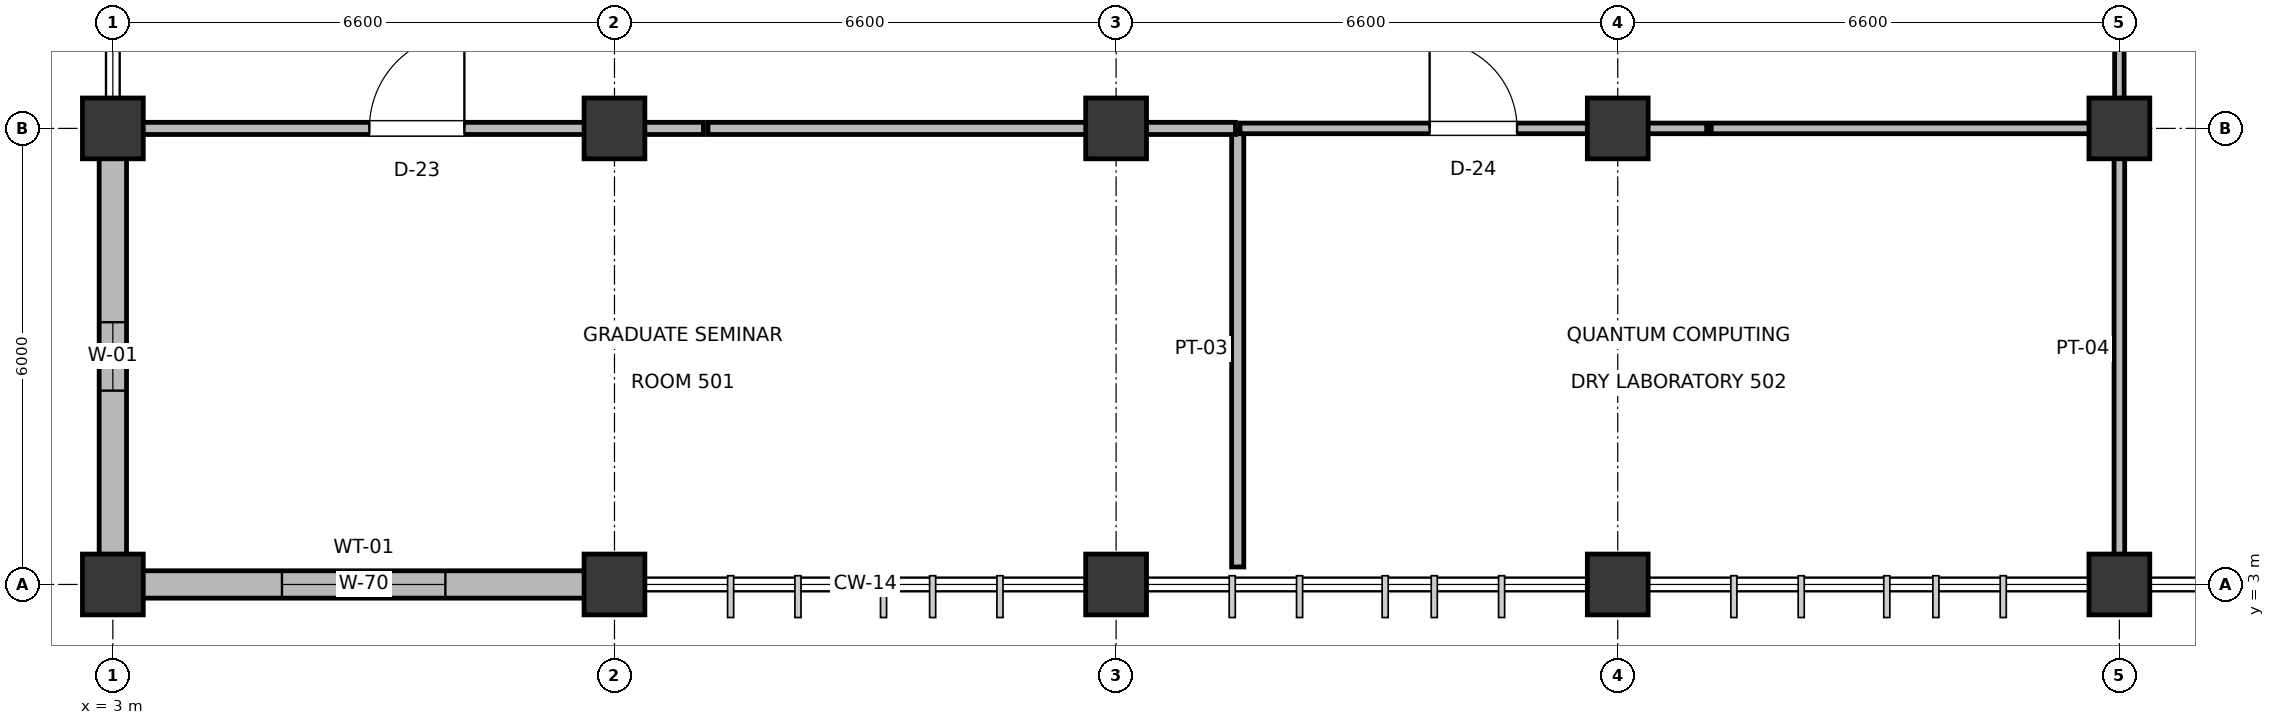
"""IFC4 building model, lengths in metres.
Left out: names, types, materials, properties, quantities, classifications, styles, units other than length and angle.
Written with IfcOpenShell. Run it as: python <this file> out.ifc"""

import sys

from ifc_helpers import new_model, si_unit, direction, frame, frame_2d, origin, origin_2d, place, context, subcontext, project, spatial, rectangle, extrude, element, fill, save


model = new_model("IFC4")
c1 = context("Model", 3, precision=1e-05, world=origin(), true_north=direction((0.0, 1.0)))
c2 = subcontext(c1, "Body", "Model", "MODEL_VIEW")
j1 = project(units=[si_unit("LENGTHUNIT", "METRE"), si_unit("PLANEANGLEUNIT", "RADIAN")], contexts=[c1])
p1 = place(None, origin())
s1 = spatial("IfcSite", under=j1, at=p1, CompositionType="ELEMENT")
p2 = place(p1, origin())
s2 = spatial("IfcBuilding", under=s1, at=p2, CompositionType="ELEMENT")
p3 = place(p2, frame((0.0, 0.0, 24.0)))
s3 = spatial("IfcBuildingStorey", under=s2, at=p3, CompositionType="ELEMENT", Elevation=24.0)
for number, where, z_axis, x_axis in (
    (1, (3.0, 3.0, 0.0), (0.0, 0.0, 1.0), (1.0, 0.0, 0.0)),
    (2, (3.0, 9.0, 0.0), (0.0, 0.0, 1.0), (1.0, 0.0, 0.0)),
    (3, (9.6, 3.0, 0.0), (0.0, 0.0, 1.0), (1.0, 0.0, 0.0)),
    (4, (9.6, 9.0, 0.0), (0.0, 0.0, 1.0), (1.0, 0.0, 0.0)),
    (5, (16.2, 3.0, 0.0), (0.0, 0.0, 1.0), (1.0, 0.0, 0.0)),
    (6, (16.2, 9.0, 0.0), (0.0, 0.0, 1.0), (1.0, 0.0, 0.0)),
    (7, (22.8, 3.0, 0.0), (0.0, 0.0, 1.0), (1.0, 0.0, 0.0)),
    (8, (22.8, 9.0, 0.0), (0.0, 0.0, 1.0), (1.0, 0.0, 0.0)),
    (9, (29.4, 3.0, 0.0), (0.0, 0.0, 1.0), (1.0, 0.0, 0.0)),
    (10, (29.4, 9.0, 0.0), (0.0, 0.0, 1.0), (1.0, 0.0, 0.0)),
):
    element("IfcColumn", number, at=place(p3, frame(where, z_axis=z_axis, x_axis=x_axis)), inside=s3, PredefinedType="COLUMN", context=c2, shape_type="SweptSolid", body=[
        extrude(rectangle(XDim=0.8, YDim=0.8, at=origin_2d()), origin(), (0.0, 0.0, 1.0), 4.5),
    ])
p4 = place(p3, frame((3.385, 3.0, 0.0), z_axis=(0.0, 0.0, 1.0), x_axis=(1.0, 0.0, 0.0)))
e11 = element("IfcWall", 11, at=p4, inside=s3, PredefinedType="SOLIDWALL", context=c2, shape_type="SweptSolid", body=[
    extrude(rectangle(XDim=5.83, YDim=0.36, at=frame_2d((2.915, 0.0))), origin(), (0.0, 0.0, 1.0), 2.87),
])
p5 = place(p4, frame((1.84, 0.0, 0.9)))
e12 = element("IfcOpeningElement", 12, at=p5, cuts=e11, PredefinedType="OPENING", context=c2, shape_type="SweptSolid", body=[
    extrude(rectangle(XDim=2.15, YDim=1.35, at=frame_2d((1.075, 0.675))), frame((0.0, 0.19, 0.0), z_axis=(0.0, -1.0, 0.0), x_axis=(1.0, 0.0, 0.0)), (0.0, 0.0, 1.0), 0.38),
])
p6 = place(p3, frame((3.0, 3.385, 0.0), z_axis=(0.0, 0.0, 1.0), x_axis=(0.0, 1.0, 0.0)))
e13 = element("IfcWall", 13, at=p6, inside=s3, PredefinedType="SOLIDWALL", context=c2, shape_type="SweptSolid", body=[
    extrude(rectangle(XDim=5.23, YDim=0.36, at=frame_2d((2.615, 0.0))), origin(), (0.0, 0.0, 1.0), 3.575),
])
p7 = place(p6, frame((2.165, 0.0, 0.9)))
e14 = element("IfcOpeningElement", 14, at=p7, cuts=e13, PredefinedType="OPENING", context=c2, shape_type="SweptSolid", body=[
    extrude(rectangle(XDim=0.9, YDim=1.8, at=frame_2d((0.45, 0.9))), frame((0.0, 0.19, 0.0), z_axis=(0.0, -1.0, 0.0), x_axis=(1.0, 0.0, 0.0)), (0.0, 0.0, 1.0), 0.38),
])
p8 = place(p3, frame((17.8, 3.23, 0.0), z_axis=(0.0, 0.0, 1.0), x_axis=(0.0, 1.0, 0.0)))
e15 = element("IfcWall", 15, at=p8, inside=s3, PredefinedType="PARTITIONING", context=c2, shape_type="SweptSolid", body=[
    extrude(rectangle(XDim=5.74, YDim=0.16, at=frame_2d((2.87, 0.0))), origin(), (0.0, 0.0, 1.0), 3.525),
])
p9 = place(p3, frame((3.23, 9.0, 0.0), z_axis=(0.0, 0.0, 1.0), x_axis=(1.0, 0.0, 0.0)))
e16 = element("IfcWall", 16, at=p9, inside=s3, PredefinedType="PARTITIONING", context=c2, shape_type="SweptSolid", body=[
    extrude(rectangle(XDim=7.54, YDim=0.16, at=frame_2d((3.77, 0.0))), origin(), (0.0, 0.0, 1.0), 3.495),
])
p10 = place(p9, frame((3.145, 0.0, 0.0)))
e17 = element("IfcOpeningElement", 17, at=p10, cuts=e16, PredefinedType="OPENING", context=c2, shape_type="SweptSolid", body=[
    extrude(rectangle(XDim=1.25, YDim=2.2, at=frame_2d((0.625, 1.1))), frame((0.0, 0.09, 0.0), z_axis=(0.0, -1.0, 0.0), x_axis=(1.0, 0.0, 0.0)), (0.0, 0.0, 1.0), 0.18),
])
p11 = place(p3, frame((10.83, 9.0, 0.0), z_axis=(0.0, 0.0, 1.0), x_axis=(1.0, 0.0, 0.0)))
e18 = element("IfcWall", 18, at=p11, inside=s3, PredefinedType="PARTITIONING", context=c2, shape_type="SweptSolid", body=[
    extrude(rectangle(XDim=6.94, YDim=0.16, at=frame_2d((3.47, 0.0))), origin(), (0.0, 0.0, 1.0), 3.495),
])
p12 = place(p3, frame((29.4, 3.23, 0.0), z_axis=(0.0, 0.0, 1.0), x_axis=(0.0, 1.0, 0.0)))
e19 = element("IfcWall", 19, at=p12, inside=s3, PredefinedType="PARTITIONING", context=c2, shape_type="SweptSolid", body=[
    extrude(rectangle(XDim=5.74, YDim=0.14, at=frame_2d((2.87, 0.0))), origin(), (0.0, 0.0, 1.0), 3.575),
])
p13 = place(p3, frame((24.03, 9.0, 0.0), z_axis=(0.0, 0.0, 1.0), x_axis=(1.0, 0.0, 0.0)))
e20 = element("IfcWall", 20, at=p13, inside=s3, PredefinedType="PARTITIONING", context=c2, shape_type="SweptSolid", body=[
    extrude(rectangle(XDim=5.34, YDim=0.14, at=frame_2d((2.67, 0.0))), origin(), (0.0, 0.0, 1.0), 3.455),
])
p14 = place(p3, frame((17.83, 9.0, 0.0), z_axis=(0.0, 0.0, 1.0), x_axis=(1.0, 0.0, 0.0)))
e21 = element("IfcWall", 21, at=p14, inside=s3, PredefinedType="PARTITIONING", context=c2, shape_type="SweptSolid", body=[
    extrude(rectangle(XDim=6.14, YDim=0.14, at=frame_2d((3.07, 0.0))), origin(), (0.0, 0.0, 1.0), 3.455),
])
p15 = place(p14, frame((2.495, 0.0, 0.0)))
e22 = element("IfcOpeningElement", 22, at=p15, cuts=e21, PredefinedType="OPENING", context=c2, shape_type="SweptSolid", body=[
    extrude(rectangle(XDim=1.15, YDim=2.15, at=frame_2d((0.575, 1.075))), frame((0.0, 0.08, 0.0), z_axis=(0.0, -1.0, 0.0), x_axis=(1.0, 0.0, 0.0)), (0.0, 0.0, 1.0), 0.16),
])
p16 = place(p3, frame((29.4, 9.03, 0.0), z_axis=(0.0, 0.0, 1.0), x_axis=(0.0, 1.0, 0.0)))
e23 = element("IfcWall", 23, at=p16, inside=s3, PredefinedType="PARTITIONING", context=c2, shape_type="SweptSolid", body=[
    extrude(rectangle(XDim=11.54, YDim=0.125, at=frame_2d((5.77, 0.0))), origin(), (0.0, 0.0, 1.0), 3.375),
])
p17 = place(p16, frame((5.23, 0.0, 0.0)))
e24 = element("IfcOpeningElement", 24, at=p17, cuts=e23, PredefinedType="OPENING", context=c2, shape_type="SweptSolid", body=[
    extrude(rectangle(XDim=1.08, YDim=2.15, at=frame_2d((0.54, 1.075))), frame((0.0, 0.073, 0.0), z_axis=(0.0, -1.0, 0.0), x_axis=(1.0, 0.0, 0.0)), (0.0, 0.0, 1.0), 0.145),
])
p18 = place(p5, frame((2.15, 0.0, 0.0), z_axis=(0.0, 0.0, 1.0), x_axis=(-1.0, 0.0, 0.0)))
e25 = element("IfcWindow", 25, at=p18, inside=s3, PartitioningType="DOUBLE_PANEL_VERTICAL", PredefinedType="WINDOW", context=c2, shape_type="SweptSolid", body=[
    extrude(rectangle(XDim=2.15, YDim=1.35, at=frame_2d((1.075, 0.675))), frame((0.0, 0.03, 0.0), z_axis=(0.0, -1.0, 0.0), x_axis=(1.0, 0.0, 0.0)), (0.0, 0.0, 1.0), 0.06),
])
fill(e12, e25)
p19 = place(p7, origin())
e26 = element("IfcWindow", 26, at=p19, inside=s3, PartitioningType="SINGLE_PANEL", PredefinedType="WINDOW", context=c2, shape_type="SweptSolid", body=[
    extrude(rectangle(XDim=0.9, YDim=1.8, at=frame_2d((0.45, 0.9))), frame((0.0, 0.03, 0.0), z_axis=(0.0, -1.0, 0.0), x_axis=(1.0, 0.0, 0.0)), (0.0, 0.0, 1.0), 0.06),
])
fill(e14, e26)
p20 = place(p10, origin())
e27 = element("IfcDoor", 27, at=p20, inside=s3, OperationType="SINGLE_SWING_RIGHT", PredefinedType="DOOR", context=c2, shape_type="SweptSolid", body=[
    extrude(rectangle(XDim=1.25, YDim=2.2, at=frame_2d((0.625, 1.1))), frame((0.0, 0.025, 0.0), z_axis=(0.0, -1.0, 0.0), x_axis=(1.0, 0.0, 0.0)), (0.0, 0.0, 1.0), 0.05),
])
fill(e17, e27)
p21 = place(p15, origin())
e28 = element("IfcDoor", 28, at=p21, inside=s3, OperationType="SINGLE_SWING_LEFT", PredefinedType="DOOR", context=c2, shape_type="SweptSolid", body=[
    extrude(rectangle(XDim=1.15, YDim=2.15, at=frame_2d((0.575, 1.075))), frame((0.0, 0.025, 0.0), z_axis=(0.0, -1.0, 0.0), x_axis=(1.0, 0.0, 0.0)), (0.0, 0.0, 1.0), 0.05),
])
fill(e22, e28)
save(model, sys.argv[1])
